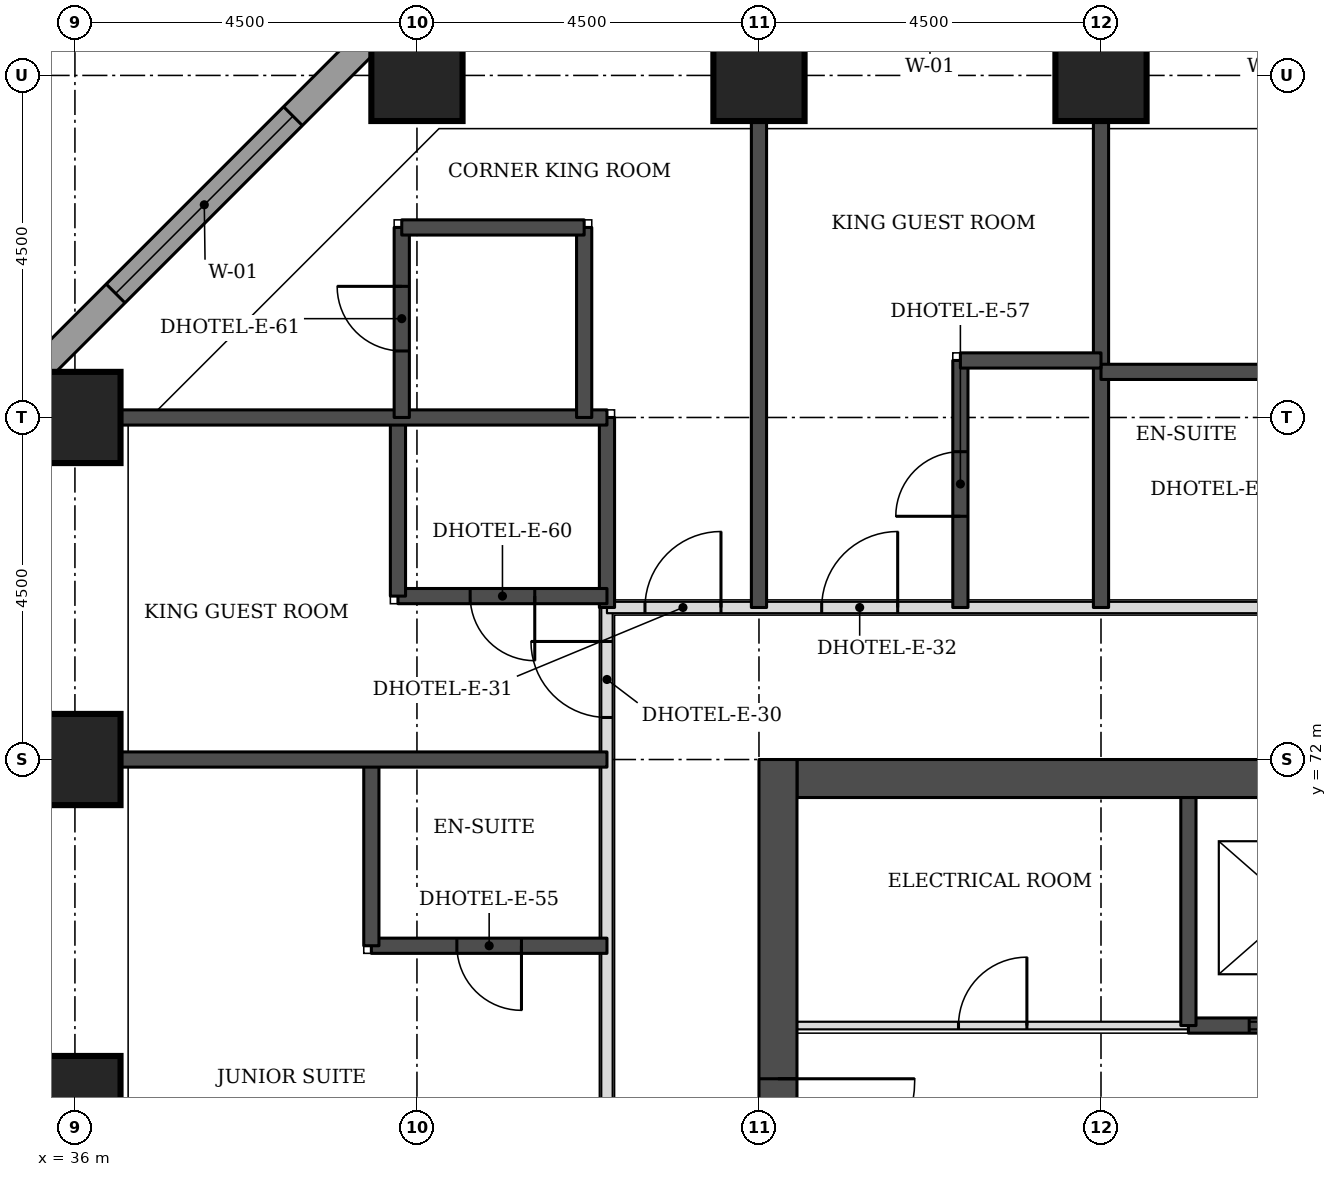
"""IFC4 building model, lengths in metres.
Left out: names, types, materials, properties, quantities, classifications, styles, units other than length and angle.
Written with IfcOpenShell. Run it as: python <this file> out.ifc"""

import sys

from ifc_helpers import new_model, si_unit, direction, frame, frame_2d, origin, origin_2d, place, context, subcontext, project, spatial, rectangle, extrude, element, fill, save


model = new_model("IFC4")
c1 = context("Model", 3, precision=1e-05, world=origin(), true_north=direction((0.0, 1.0)))
c2 = subcontext(c1, "Body", "Model", "MODEL_VIEW")
j1 = project(units=[si_unit("LENGTHUNIT", "METRE"), si_unit("PLANEANGLEUNIT", "RADIAN")], contexts=[c1])
p1 = place(None, origin())
s1 = spatial("IfcSite", under=j1, at=p1, CompositionType="ELEMENT")
p2 = place(p1, origin())
s2 = spatial("IfcBuilding", under=s1, at=p2, CompositionType="ELEMENT")
p3 = place(p2, frame((0.0, 0.0, 62.7)))
s3 = spatial("IfcBuildingStorey", under=s2, at=p3, CompositionType="ELEMENT", Elevation=62.7)
for number, where, z_axis, x_axis in (
    (1, (36.0, 67.5, 0.0), (0.0, 0.0, 1.0), (1.0, 0.0, 0.0)),
    (2, (36.0, 72.0, 0.0), (0.0, 0.0, 1.0), (1.0, 0.0, 0.0)),
    (3, (36.0, 76.5, 0.0), (0.0, 0.0, 1.0), (1.0, 0.0, 0.0)),
    (4, (40.5, 81.0, 0.0), (0.0, 0.0, 1.0), (1.0, 0.0, 0.0)),
    (5, (45.0, 81.0, 0.0), (0.0, 0.0, 1.0), (1.0, 0.0, 0.0)),
    (6, (49.5, 81.0, 0.0), (0.0, 0.0, 1.0), (1.0, 0.0, 0.0)),
):
    element("IfcColumn", number, at=place(p3, frame(where, z_axis=z_axis, x_axis=x_axis)), inside=s3, PredefinedType="COLUMN", context=c2, shape_type="SweptSolid", body=[
        extrude(rectangle(XDim=1.2, YDim=1.2, at=origin_2d()), origin(), (0.0, 0.0, 1.0), 3.3),
    ])
p4 = place(p3, frame((45.5, 71.75, 0.0), z_axis=(0.0, 0.0, 1.0), x_axis=(1.0, 0.0, 0.0)))
e7 = element("IfcWall", 7, at=p4, inside=s3, PredefinedType="SHEAR", context=c2, shape_type="SweptSolid", body=[
    extrude(rectangle(XDim=21.5, YDim=0.5, at=frame_2d((10.75, 0.0))), origin(), (0.0, 0.0, 1.0), 3.3),
])
p5 = place(p3, frame((45.25, 49.5, 0.0), z_axis=(0.0, 0.0, 1.0), x_axis=(0.0, 1.0, 0.0)))
e8 = element("IfcWall", 8, at=p5, inside=s3, PredefinedType="SHEAR", context=c2, shape_type="SweptSolid", body=[
    extrude(rectangle(XDim=22.5, YDim=0.5, at=frame_2d((11.25, 0.0))), origin(), (0.0, 0.0, 1.0), 3.3),
])
p6 = place(p5, frame((4.2, 0.0, 0.0)))
e9 = element("IfcOpeningElement", 9, at=p6, cuts=e8, PredefinedType="OPENING", context=c2, shape_type="SweptSolid", body=[
    extrude(rectangle(XDim=1.8, YDim=2.1, at=frame_2d((0.9, 1.05))), frame((0.0, 0.26, 0.0), z_axis=(0.0, -1.0, 0.0), x_axis=(1.0, 0.0, 0.0)), (0.0, 0.0, 1.0), 0.52),
])
p7 = place(p5, frame((6.9, 0.0, 0.0)))
e10 = element("IfcOpeningElement", 10, at=p7, cuts=e8, PredefinedType="OPENING", context=c2, shape_type="SweptSolid", body=[
    extrude(rectangle(XDim=1.1, YDim=2.1, at=frame_2d((0.55, 1.05))), frame((0.0, 0.26, 0.0), z_axis=(0.0, -1.0, 0.0), x_axis=(1.0, 0.0, 0.0)), (0.0, 0.0, 1.0), 0.52),
])
p8 = place(p5, frame((13.6, 0.0, 0.0)))
e11 = element("IfcOpeningElement", 11, at=p8, cuts=e8, PredefinedType="OPENING", context=c2, shape_type="SweptSolid", body=[
    extrude(rectangle(XDim=1.1, YDim=2.1, at=frame_2d((0.55, 1.05))), frame((0.0, 0.26, 0.0), z_axis=(0.0, -1.0, 0.0), x_axis=(1.0, 0.0, 0.0)), (0.0, 0.0, 1.0), 0.52),
])
p9 = place(p5, frame((16.5, 0.0, 0.0)))
e12 = element("IfcOpeningElement", 12, at=p9, cuts=e8, PredefinedType="OPENING", context=c2, shape_type="SweptSolid", body=[
    extrude(rectangle(XDim=1.8, YDim=2.1, at=frame_2d((0.9, 1.05))), frame((0.0, 0.26, 0.0), z_axis=(0.0, -1.0, 0.0), x_axis=(1.0, 0.0, 0.0)), (0.0, 0.0, 1.0), 0.52),
])
p10 = place(p3, frame((40.23, 81.826, 0.0), z_axis=(0.0, 0.0, 1.0), x_axis=(-0.707106781187, -0.707106781187, 0.0)))
e13 = element("IfcWall", 13, at=p10, inside=s3, PredefinedType="STANDARD", context=c2, shape_type="SweptSolid", body=[
    extrude(rectangle(XDim=7.151, YDim=0.35, at=frame_2d((3.576, 0.0))), origin(), (0.0, 0.0, 1.0), 3.055),
])
p11 = place(p10, frame((1.926, 0.0, 0.8)))
e14 = element("IfcOpeningElement", 14, at=p11, cuts=e13, PredefinedType="OPENING", context=c2, shape_type="SweptSolid", body=[
    extrude(rectangle(XDim=3.3, YDim=1.5, at=frame_2d((1.65, 0.75))), frame((0.0, 0.185, 0.0), z_axis=(0.0, -1.0, 0.0), x_axis=(1.0, 0.0, 0.0)), (0.0, 0.0, 1.0), 0.37),
])
p12 = place(p3, frame((43.0, 57.35, 0.0), z_axis=(0.0, 0.0, 1.0), x_axis=(0.0, 1.0, 0.0)))
e15 = element("IfcWall", 15, at=p12, inside=s3, PredefinedType="PARTITIONING", context=c2, shape_type="SweptSolid", body=[
    extrude(rectangle(XDim=16.65, YDim=0.15, at=frame_2d((8.325, 0.0))), origin(), (0.0, 0.0, 1.0), 3.08),
])
p13 = place(p12, frame((8.425, 0.0, 0.0)))
e16 = element("IfcOpeningElement", 16, at=p13, cuts=e15, PredefinedType="OPENING", context=c2, shape_type="SweptSolid", body=[
    extrude(rectangle(XDim=1.0, YDim=2.1, at=frame_2d((0.5, 1.05))), frame((0.0, 0.085, 0.0), z_axis=(0.0, -1.0, 0.0), x_axis=(1.0, 0.0, 0.0)), (0.0, 0.0, 1.0), 0.17),
])
p14 = place(p12, frame((15.203, 0.0, 0.0)))
e17 = element("IfcOpeningElement", 17, at=p14, cuts=e15, PredefinedType="OPENING", context=c2, shape_type="SweptSolid", body=[
    extrude(rectangle(XDim=1.0, YDim=2.1, at=frame_2d((0.5, 1.05))), frame((0.0, 0.085, 0.0), z_axis=(0.0, -1.0, 0.0), x_axis=(1.0, 0.0, 0.0)), (0.0, 0.0, 1.0), 0.17),
])
p15 = place(p3, frame((43.0, 74.0, 0.0), z_axis=(0.0, 0.0, 1.0), x_axis=(1.0, 0.0, 0.0)))
e18 = element("IfcWall", 18, at=p15, inside=s3, PredefinedType="PARTITIONING", context=c2, shape_type="SweptSolid", body=[
    extrude(rectangle(XDim=26.5, YDim=0.15, at=frame_2d((13.25, 0.0))), origin(), (0.0, 0.0, 1.0), 3.08),
])
p16 = place(p15, frame((2.825, 0.0, 0.0)))
e19 = element("IfcOpeningElement", 19, at=p16, cuts=e18, PredefinedType="OPENING", context=c2, shape_type="SweptSolid", body=[
    extrude(rectangle(XDim=1.0, YDim=2.1, at=frame_2d((0.5, 1.05))), frame((0.0, 0.085, 0.0), z_axis=(0.0, -1.0, 0.0), x_axis=(1.0, 0.0, 0.0)), (0.0, 0.0, 1.0), 0.17),
])
p17 = place(p15, frame((11.975, 0.0, 0.0)))
e20 = element("IfcOpeningElement", 20, at=p17, cuts=e18, PredefinedType="OPENING", context=c2, shape_type="SweptSolid", body=[
    extrude(rectangle(XDim=1.0, YDim=2.1, at=frame_2d((0.5, 1.05))), frame((0.0, 0.085, 0.0), z_axis=(0.0, -1.0, 0.0), x_axis=(1.0, 0.0, 0.0)), (0.0, 0.0, 1.0), 0.17),
])
p18 = place(p15, frame((18.275, 0.0, 0.0)))
e21 = element("IfcOpeningElement", 21, at=p18, cuts=e18, PredefinedType="OPENING", context=c2, shape_type="SweptSolid", body=[
    extrude(rectangle(XDim=1.0, YDim=2.1, at=frame_2d((0.5, 1.05))), frame((0.0, 0.085, 0.0), z_axis=(0.0, -1.0, 0.0), x_axis=(1.0, 0.0, 0.0)), (0.0, 0.0, 1.0), 0.17),
])
p19 = place(p15, frame((0.5, 0.0, 0.0)))
e22 = element("IfcOpeningElement", 22, at=p19, cuts=e18, PredefinedType="OPENING", context=c2, shape_type="SweptSolid", body=[
    extrude(rectangle(XDim=1.0, YDim=2.1, at=frame_2d((0.5, 1.05))), frame((0.0, 0.085, 0.0), z_axis=(0.0, -1.0, 0.0), x_axis=(1.0, 0.0, 0.0)), (0.0, 0.0, 1.0), 0.17),
])
p20 = place(p15, frame((25.0, 0.0, 0.0)))
e23 = element("IfcOpeningElement", 23, at=p20, cuts=e18, PredefinedType="OPENING", context=c2, shape_type="SweptSolid", body=[
    extrude(rectangle(XDim=1.0, YDim=2.1, at=frame_2d((0.5, 1.05))), frame((0.0, 0.085, 0.0), z_axis=(0.0, -1.0, 0.0), x_axis=(1.0, 0.0, 0.0)), (0.0, 0.0, 1.0), 0.17),
])
p21 = place(p3, frame((39.9, 69.55, 0.0), z_axis=(0.0, 0.0, 1.0), x_axis=(1.0, 0.0, 0.0)))
e24 = element("IfcWall", 24, at=p21, inside=s3, PredefinedType="SOLIDWALL", context=c2, shape_type="SweptSolid", body=[
    extrude(rectangle(XDim=3.1, YDim=0.2, at=frame_2d((1.55, 0.0))), origin(), (0.0, 0.0, 1.0), 3.08),
])
p22 = place(p21, frame((1.125, 0.0, 0.0)))
e25 = element("IfcOpeningElement", 25, at=p22, cuts=e24, PredefinedType="OPENING", context=c2, shape_type="SweptSolid", body=[
    extrude(rectangle(XDim=0.85, YDim=2.1, at=frame_2d((0.425, 1.05))), frame((0.0, 0.11, 0.0), z_axis=(0.0, -1.0, 0.0), x_axis=(1.0, 0.0, 0.0)), (0.0, 0.0, 1.0), 0.22),
])
p23 = place(p3, frame((39.9, 69.55, 0.0), z_axis=(0.0, 0.0, 1.0), x_axis=(0.0, 1.0, 0.0)))
e26 = element("IfcWall", 26, at=p23, inside=s3, PredefinedType="SOLIDWALL", context=c2, shape_type="SweptSolid", body=[
    extrude(rectangle(XDim=2.45, YDim=0.2, at=frame_2d((1.225, 0.0))), origin(), (0.0, 0.0, 1.0), 3.08),
])
p24 = place(p3, frame((36.6, 72.0, 0.0), z_axis=(0.0, 0.0, 1.0), x_axis=(1.0, 0.0, 0.0)))
e27 = element("IfcWall", 27, at=p24, inside=s3, PredefinedType="SOLIDWALL", context=c2, shape_type="SweptSolid", body=[
    extrude(rectangle(XDim=6.4, YDim=0.2, at=frame_2d((3.2, 0.0))), origin(), (0.0, 0.0, 1.0), 3.08),
])
p25 = place(p3, frame((43.0, 74.0, 0.0), z_axis=(0.0, 0.0, 1.0), x_axis=(0.0, 1.0, 0.0)))
e28 = element("IfcWall", 28, at=p25, inside=s3, PredefinedType="SOLIDWALL", context=c2, shape_type="SweptSolid", body=[
    extrude(rectangle(XDim=2.5, YDim=0.2, at=frame_2d((1.25, 0.0))), origin(), (0.0, 0.0, 1.0), 3.08),
])
p26 = place(p3, frame((45.0, 74.0, 0.0), z_axis=(0.0, 0.0, 1.0), x_axis=(0.0, 1.0, 0.0)))
e29 = element("IfcWall", 29, at=p26, inside=s3, PredefinedType="SOLIDWALL", context=c2, shape_type="SweptSolid", body=[
    extrude(rectangle(XDim=6.4, YDim=0.2, at=frame_2d((3.2, 0.0))), origin(), (0.0, 0.0, 1.0), 3.08),
])
p27 = place(p3, frame((47.65, 74.0, 0.0), z_axis=(0.0, 0.0, 1.0), x_axis=(0.0, 1.0, 0.0)))
e30 = element("IfcWall", 30, at=p27, inside=s3, PredefinedType="SOLIDWALL", context=c2, shape_type="SweptSolid", body=[
    extrude(rectangle(XDim=3.25, YDim=0.2, at=frame_2d((1.625, 0.0))), origin(), (0.0, 0.0, 1.0), 3.08),
])
p28 = place(p27, frame((1.2, 0.0, 0.0)))
e31 = element("IfcOpeningElement", 31, at=p28, cuts=e30, PredefinedType="OPENING", context=c2, shape_type="SweptSolid", body=[
    extrude(rectangle(XDim=0.85, YDim=2.1, at=frame_2d((0.425, 1.05))), frame((0.0, 0.11, 0.0), z_axis=(0.0, -1.0, 0.0), x_axis=(1.0, 0.0, 0.0)), (0.0, 0.0, 1.0), 0.22),
])
p29 = place(p3, frame((49.5, 74.0, 0.0), z_axis=(0.0, 0.0, 1.0), x_axis=(0.0, 1.0, 0.0)))
e32 = element("IfcWall", 32, at=p29, inside=s3, PredefinedType="SOLIDWALL", context=c2, shape_type="SweptSolid", body=[
    extrude(rectangle(XDim=6.4, YDim=0.2, at=frame_2d((3.2, 0.0))), origin(), (0.0, 0.0, 1.0), 3.08),
])
p30 = place(p3, frame((40.25, 74.15, 0.0), z_axis=(0.0, 0.0, 1.0), x_axis=(1.0, 0.0, 0.0)))
e33 = element("IfcWall", 33, at=p30, inside=s3, PredefinedType="SOLIDWALL", context=c2, shape_type="SweptSolid", body=[
    extrude(rectangle(XDim=2.75, YDim=0.2, at=frame_2d((1.375, 0.0))), origin(), (0.0, 0.0, 1.0), 3.08),
])
p31 = place(p30, frame((0.95, 0.0, 0.0)))
e34 = element("IfcOpeningElement", 34, at=p31, cuts=e33, PredefinedType="OPENING", context=c2, shape_type="SweptSolid", body=[
    extrude(rectangle(XDim=0.85, YDim=2.1, at=frame_2d((0.425, 1.05))), frame((0.0, 0.11, 0.0), z_axis=(0.0, -1.0, 0.0), x_axis=(1.0, 0.0, 0.0)), (0.0, 0.0, 1.0), 0.22),
])
p32 = place(p3, frame((40.25, 74.15, 0.0), z_axis=(0.0, 0.0, 1.0), x_axis=(0.0, 1.0, 0.0)))
e35 = element("IfcWall", 35, at=p32, inside=s3, PredefinedType="SOLIDWALL", context=c2, shape_type="SweptSolid", body=[
    extrude(rectangle(XDim=2.35, YDim=0.2, at=frame_2d((1.175, 0.0))), origin(), (0.0, 0.0, 1.0), 3.08),
])
p33 = place(p3, frame((36.6, 76.5, 0.0), z_axis=(0.0, 0.0, 1.0), x_axis=(1.0, 0.0, 0.0)))
e36 = element("IfcWall", 36, at=p33, inside=s3, PredefinedType="SOLIDWALL", context=c2, shape_type="SweptSolid", body=[
    extrude(rectangle(XDim=6.4, YDim=0.2, at=frame_2d((3.2, 0.0))), origin(), (0.0, 0.0, 1.0), 3.08),
])
p34 = place(p3, frame((40.3, 76.5, 0.0), z_axis=(0.0, 0.0, 1.0), x_axis=(0.0, 1.0, 0.0)))
e37 = element("IfcWall", 37, at=p34, inside=s3, PredefinedType="SOLIDWALL", context=c2, shape_type="SweptSolid", body=[
    extrude(rectangle(XDim=2.5, YDim=0.2, at=frame_2d((1.25, 0.0))), origin(), (0.0, 0.0, 1.0), 3.08),
])
p35 = place(p34, frame((0.875, 0.0, 0.0)))
e38 = element("IfcOpeningElement", 38, at=p35, cuts=e37, PredefinedType="OPENING", context=c2, shape_type="SweptSolid", body=[
    extrude(rectangle(XDim=0.85, YDim=2.1, at=frame_2d((0.425, 1.05))), frame((0.0, 0.11, 0.0), z_axis=(0.0, -1.0, 0.0), x_axis=(1.0, 0.0, 0.0)), (0.0, 0.0, 1.0), 0.22),
])
p36 = place(p3, frame((42.7, 76.5, 0.0), z_axis=(0.0, 0.0, 1.0), x_axis=(0.0, 1.0, 0.0)))
e39 = element("IfcWall", 39, at=p36, inside=s3, PredefinedType="SOLIDWALL", context=c2, shape_type="SweptSolid", body=[
    extrude(rectangle(XDim=2.5, YDim=0.2, at=frame_2d((1.25, 0.0))), origin(), (0.0, 0.0, 1.0), 3.08),
])
p37 = place(p3, frame((49.5, 77.1, 0.0), z_axis=(0.0, 0.0, 1.0), x_axis=(1.0, 0.0, 0.0)))
e40 = element("IfcWall", 40, at=p37, inside=s3, PredefinedType="SOLIDWALL", context=c2, shape_type="SweptSolid", body=[
    extrude(rectangle(XDim=2.95, YDim=0.2, at=frame_2d((1.475, 0.0))), origin(), (0.0, 0.0, 1.0), 3.08),
])
p38 = place(p3, frame((47.65, 77.25, 0.0), z_axis=(0.0, 0.0, 1.0), x_axis=(1.0, 0.0, 0.0)))
e41 = element("IfcWall", 41, at=p38, inside=s3, PredefinedType="SOLIDWALL", context=c2, shape_type="SweptSolid", body=[
    extrude(rectangle(XDim=1.85, YDim=0.2, at=frame_2d((0.925, 0.0))), origin(), (0.0, 0.0, 1.0), 3.08),
])
p39 = place(p3, frame((40.3, 79.0, 0.0), z_axis=(0.0, 0.0, 1.0), x_axis=(1.0, 0.0, 0.0)))
e42 = element("IfcWall", 42, at=p39, inside=s3, PredefinedType="SOLIDWALL", context=c2, shape_type="SweptSolid", body=[
    extrude(rectangle(XDim=2.4, YDim=0.2, at=frame_2d((1.2, 0.0))), origin(), (0.0, 0.0, 1.0), 3.08),
])
p40 = place(p3, frame((45.5, 68.5, 0.0), z_axis=(0.0, 0.0, 1.0), x_axis=(1.0, 0.0, 0.0)))
e43 = element("IfcWall", 43, at=p40, inside=s3, PredefinedType="PARTITIONING", context=c2, shape_type="SweptSolid", body=[
    extrude(rectangle(XDim=5.15, YDim=0.1, at=frame_2d((2.575, 0.0))), origin(), (0.0, 0.0, 1.0), 3.08),
])
p41 = place(p40, frame((2.125, 0.0, 0.0)))
e44 = element("IfcOpeningElement", 44, at=p41, cuts=e43, PredefinedType="OPENING", context=c2, shape_type="SweptSolid", body=[
    extrude(rectangle(XDim=0.9, YDim=2.1, at=frame_2d((0.45, 1.05))), frame((0.0, 0.06, 0.0), z_axis=(0.0, -1.0, 0.0), x_axis=(1.0, 0.0, 0.0)), (0.0, 0.0, 1.0), 0.12),
])
p42 = place(p3, frame((50.65, 68.5, 0.0), z_axis=(0.0, 0.0, 1.0), x_axis=(1.0, 0.0, 0.0)))
e45 = element("IfcWall", 45, at=p42, inside=s3, PredefinedType="SOLIDWALL", context=c2, shape_type="SweptSolid", body=[
    extrude(rectangle(XDim=11.2, YDim=0.2, at=frame_2d((5.6, 0.0))), origin(), (0.0, 0.0, 1.0), 3.08),
])
p43 = place(p42, frame((0.8, 0.0, 0.0)))
e46 = element("IfcOpeningElement", 46, at=p43, cuts=e45, PredefinedType="OPENING", context=c2, shape_type="SweptSolid", body=[
    extrude(rectangle(XDim=1.2, YDim=2.1, at=frame_2d((0.6, 1.05))), frame((0.0, 0.11, 0.0), z_axis=(0.0, -1.0, 0.0), x_axis=(1.0, 0.0, 0.0)), (0.0, 0.0, 1.0), 0.22),
])
p44 = place(p42, frame((3.6, 0.0, 0.0)))
e47 = element("IfcOpeningElement", 47, at=p44, cuts=e45, PredefinedType="OPENING", context=c2, shape_type="SweptSolid", body=[
    extrude(rectangle(XDim=1.2, YDim=2.1, at=frame_2d((0.6, 1.05))), frame((0.0, 0.11, 0.0), z_axis=(0.0, -1.0, 0.0), x_axis=(1.0, 0.0, 0.0)), (0.0, 0.0, 1.0), 0.22),
])
p45 = place(p42, frame((6.4, 0.0, 0.0)))
e48 = element("IfcOpeningElement", 48, at=p45, cuts=e45, PredefinedType="OPENING", context=c2, shape_type="SweptSolid", body=[
    extrude(rectangle(XDim=1.2, YDim=2.1, at=frame_2d((0.6, 1.05))), frame((0.0, 0.11, 0.0), z_axis=(0.0, -1.0, 0.0), x_axis=(1.0, 0.0, 0.0)), (0.0, 0.0, 1.0), 0.22),
])
p46 = place(p42, frame((9.2, 0.0, 0.0)))
e49 = element("IfcOpeningElement", 49, at=p46, cuts=e45, PredefinedType="OPENING", context=c2, shape_type="SweptSolid", body=[
    extrude(rectangle(XDim=1.2, YDim=2.1, at=frame_2d((0.6, 1.05))), frame((0.0, 0.11, 0.0), z_axis=(0.0, -1.0, 0.0), x_axis=(1.0, 0.0, 0.0)), (0.0, 0.0, 1.0), 0.22),
])
p47 = place(p3, frame((50.65, 68.5, 0.0), z_axis=(0.0, 0.0, 1.0), x_axis=(0.0, 1.0, 0.0)))
e50 = element("IfcWall", 50, at=p47, inside=s3, PredefinedType="SOLIDWALL", context=c2, shape_type="SweptSolid", body=[
    extrude(rectangle(XDim=3.0, YDim=0.2, at=frame_2d((1.5, 0.0))), origin(), (0.0, 0.0, 1.0), 3.08),
])
p48 = place(p11, origin())
e51 = element("IfcWindow", 51, at=p48, inside=s3, PartitioningType="SINGLE_PANEL", PredefinedType="WINDOW", context=c2, shape_type="SweptSolid", body=[
    extrude(rectangle(XDim=3.3, YDim=1.5, at=frame_2d((1.65, 0.75))), frame((0.0, 0.085, 0.0), z_axis=(0.0, -1.0, 0.0), x_axis=(1.0, 0.0, 0.0)), (0.0, 0.0, 1.0), 0.06),
])
fill(e14, e51)
p49 = place(p22, frame((0.85, 0.0, 0.0), z_axis=(0.0, 0.0, 1.0), x_axis=(-1.0, 0.0, 0.0)))
e52 = element("IfcDoor", 52, at=p49, inside=s3, OperationType="SINGLE_SWING_LEFT", PredefinedType="DOOR", context=c2, shape_type="SweptSolid", body=[
    extrude(rectangle(XDim=0.85, YDim=2.1, at=frame_2d((0.425, 1.05))), frame((0.0, 0.025, 0.0), z_axis=(0.0, -1.0, 0.0), x_axis=(1.0, 0.0, 0.0)), (0.0, 0.0, 1.0), 0.05),
])
fill(e25, e52)
p50 = place(p14, origin())
e53 = element("IfcDoor", 53, at=p50, inside=s3, OperationType="SINGLE_SWING_RIGHT", PredefinedType="DOOR", context=c2, shape_type="SweptSolid", body=[
    extrude(rectangle(XDim=1.0, YDim=2.1, at=frame_2d((0.5, 1.05))), frame((0.0, 0.025, 0.0), z_axis=(0.0, -1.0, 0.0), x_axis=(1.0, 0.0, 0.0)), (0.0, 0.0, 1.0), 0.05),
])
fill(e17, e53)
p51 = place(p31, frame((0.85, 0.0, 0.0), z_axis=(0.0, 0.0, 1.0), x_axis=(-1.0, 0.0, 0.0)))
e54 = element("IfcDoor", 54, at=p51, inside=s3, OperationType="SINGLE_SWING_LEFT", PredefinedType="DOOR", context=c2, shape_type="SweptSolid", body=[
    extrude(rectangle(XDim=0.85, YDim=2.1, at=frame_2d((0.425, 1.05))), frame((0.0, 0.025, 0.0), z_axis=(0.0, -1.0, 0.0), x_axis=(1.0, 0.0, 0.0)), (0.0, 0.0, 1.0), 0.05),
])
fill(e34, e54)
p52 = place(p16, origin())
e55 = element("IfcDoor", 55, at=p52, inside=s3, OperationType="SINGLE_SWING_RIGHT", PredefinedType="DOOR", context=c2, shape_type="SweptSolid", body=[
    extrude(rectangle(XDim=1.0, YDim=2.1, at=frame_2d((0.5, 1.05))), frame((0.0, 0.025, 0.0), z_axis=(0.0, -1.0, 0.0), x_axis=(1.0, 0.0, 0.0)), (0.0, 0.0, 1.0), 0.05),
])
fill(e19, e55)
p53 = place(p28, origin())
e56 = element("IfcDoor", 56, at=p53, inside=s3, OperationType="SINGLE_SWING_LEFT", PredefinedType="DOOR", context=c2, shape_type="SweptSolid", body=[
    extrude(rectangle(XDim=0.85, YDim=2.1, at=frame_2d((0.425, 1.05))), frame((0.0, 0.025, 0.0), z_axis=(0.0, -1.0, 0.0), x_axis=(1.0, 0.0, 0.0)), (0.0, 0.0, 1.0), 0.05),
])
fill(e31, e56)
p54 = place(p19, origin())
e57 = element("IfcDoor", 57, at=p54, inside=s3, OperationType="SINGLE_SWING_RIGHT", PredefinedType="DOOR", context=c2, shape_type="SweptSolid", body=[
    extrude(rectangle(XDim=1.0, YDim=2.1, at=frame_2d((0.5, 1.05))), frame((0.0, 0.025, 0.0), z_axis=(0.0, -1.0, 0.0), x_axis=(1.0, 0.0, 0.0)), (0.0, 0.0, 1.0), 0.05),
])
fill(e22, e57)
p55 = place(p35, origin())
e58 = element("IfcDoor", 58, at=p55, inside=s3, OperationType="SINGLE_SWING_RIGHT", PredefinedType="DOOR", context=c2, shape_type="SweptSolid", body=[
    extrude(rectangle(XDim=0.85, YDim=2.1, at=frame_2d((0.425, 1.05))), frame((0.0, 0.025, 0.0), z_axis=(0.0, -1.0, 0.0), x_axis=(1.0, 0.0, 0.0)), (0.0, 0.0, 1.0), 0.05),
])
fill(e38, e58)
p56 = place(p43, origin())
e59 = element("IfcDoor", 59, at=p56, inside=s3, OperationType="DOUBLE_DOOR_SLIDING", PredefinedType="DOOR", context=c2, shape_type="SweptSolid", body=[
    extrude(rectangle(XDim=1.2, YDim=2.1, at=frame_2d((0.6, 1.05))), frame((0.0, 0.025, 0.0), z_axis=(0.0, -1.0, 0.0), x_axis=(1.0, 0.0, 0.0)), (0.0, 0.0, 1.0), 0.05),
])
fill(e46, e59)
p57 = place(p9, frame((1.8, 0.0, 0.0), z_axis=(0.0, 0.0, 1.0), x_axis=(-1.0, 0.0, 0.0)))
e60 = element("IfcDoor", 60, at=p57, inside=s3, OperationType="SINGLE_SWING_LEFT", PredefinedType="DOOR", context=c2, shape_type="SweptSolid", body=[
    extrude(rectangle(XDim=1.8, YDim=2.1, at=frame_2d((0.9, 1.05))), frame((0.0, 0.025, 0.0), z_axis=(0.0, -1.0, 0.0), x_axis=(1.0, 0.0, 0.0)), (0.0, 0.0, 1.0), 0.05),
])
fill(e12, e60)
p58 = place(p41, origin())
e61 = element("IfcDoor", 61, at=p58, inside=s3, OperationType="SINGLE_SWING_RIGHT", PredefinedType="DOOR", context=c2, shape_type="SweptSolid", body=[
    extrude(rectangle(XDim=0.9, YDim=2.1, at=frame_2d((0.45, 1.05))), frame((0.0, 0.025, 0.0), z_axis=(0.0, -1.0, 0.0), x_axis=(1.0, 0.0, 0.0)), (0.0, 0.0, 1.0), 0.05),
])
fill(e44, e61)
save(model, sys.argv[1])
